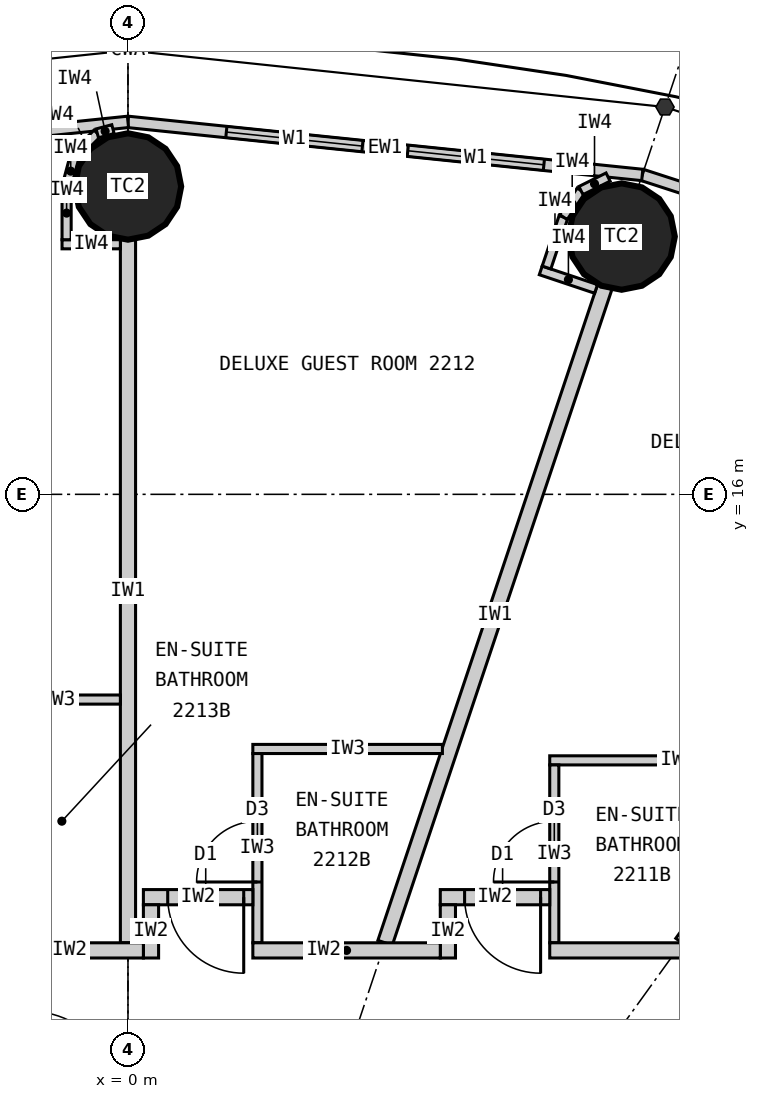
"""IFC4 building model, lengths in metres.
Left out: names, types, materials, properties, quantities, classifications, styles, units other than length and angle.
Written with IfcOpenShell. Run it as: python <this file> out.ifc"""

import sys

from ifc_helpers import new_model, si_unit, direction, frame, frame_2d, origin, origin_2d, place, context, subcontext, project, spatial, rectangle, circle, extrude, element, fill, save


model = new_model("IFC4")
c1 = context("Model", 3, precision=1e-05, world=origin(), true_north=direction((0.0, 1.0)))
c2 = subcontext(c1, "Body", "Model", "MODEL_VIEW")
j1 = project(units=[si_unit("LENGTHUNIT", "METRE"), si_unit("PLANEANGLEUNIT", "RADIAN")], contexts=[c1])
p1 = place(None, origin())
s1 = spatial("IfcSite", under=j1, at=p1, CompositionType="ELEMENT")
p2 = place(p1, origin())
s2 = spatial("IfcBuilding", under=s1, at=p2, CompositionType="ELEMENT")
p3 = place(p2, frame((0.0, 0.0, 87.0)))
s3 = spatial("IfcBuildingStorey", under=s2, at=p3, CompositionType="ELEMENT", Elevation=87.0)
for number, where, z_axis, x_axis in (
    (1, (6.495, 19.391, 0.0), (0.0, 0.0, 1.0), (1.0, 0.0, 0.0)),
    (2, (0.0, 20.05, 0.0), (0.0, 0.0, 1.0), (1.0, 0.0, 0.0)),
):
    element("IfcColumn", number, at=place(p3, frame(where, z_axis=z_axis, x_axis=x_axis)), inside=s3, PredefinedType="COLUMN", context=c2, shape_type="SweptSolid", body=[
        extrude(circle(Radius=0.7, at=origin_2d()), origin(), (0.0, 0.0, 1.0), 3.3),
    ])
p4 = place(p3, frame((13.096, 18.147, 0.0), z_axis=(0.0, 0.0, 1.0), x_axis=(-0.951137534625, 0.308767534285, 0.0)))
e3 = element("IfcWall", 3, at=p4, inside=s3, PredefinedType="ELEMENTEDWALL", context=c2, shape_type="SweptSolid", body=[
    extrude(rectangle(XDim=6.655, YDim=0.15, at=frame_2d((3.328, 0.0))), origin(), (0.0, 0.0, 1.0), 3.12),
])
p5 = place(p4, frame((1.228, 0.0, 0.9)))
e4 = element("IfcOpeningElement", 4, at=p5, cuts=e3, PredefinedType="OPENING", context=c2, shape_type="SweptSolid", body=[
    extrude(rectangle(XDim=1.8, YDim=1.9, at=frame_2d((0.9, 0.95))), frame((0.0, 0.085, 0.0), z_axis=(0.0, -1.0, 0.0), x_axis=(1.0, 0.0, 0.0)), (0.0, 0.0, 1.0), 0.17),
])
p6 = place(p4, frame((3.628, 0.0, 0.9)))
e5 = element("IfcOpeningElement", 5, at=p6, cuts=e3, PredefinedType="OPENING", context=c2, shape_type="SweptSolid", body=[
    extrude(rectangle(XDim=1.8, YDim=1.9, at=frame_2d((0.9, 0.95))), frame((0.0, 0.085, 0.0), z_axis=(0.0, -1.0, 0.0), x_axis=(1.0, 0.0, 0.0)), (0.0, 0.0, 1.0), 0.17),
])
p7 = place(p3, frame((6.766, 20.202, 0.0), z_axis=(0.0, 0.0, 1.0), x_axis=(-0.994721394369, 0.102612609291, 0.0)))
e6 = element("IfcWall", 6, at=p7, inside=s3, PredefinedType="ELEMENTEDWALL", context=c2, shape_type="SweptSolid", body=[
    extrude(rectangle(XDim=6.802, YDim=0.15, at=frame_2d((3.401, 0.0))), origin(), (0.0, 0.0, 1.0), 3.12),
])
p8 = place(p7, frame((1.301, 0.0, 0.9)))
e7 = element("IfcOpeningElement", 7, at=p8, cuts=e6, PredefinedType="OPENING", context=c2, shape_type="SweptSolid", body=[
    extrude(rectangle(XDim=1.8, YDim=1.9, at=frame_2d((0.9, 0.95))), frame((0.0, 0.085, 0.0), z_axis=(0.0, -1.0, 0.0), x_axis=(1.0, 0.0, 0.0)), (0.0, 0.0, 1.0), 0.17),
])
p9 = place(p7, frame((3.701, 0.0, 0.9)))
e8 = element("IfcOpeningElement", 8, at=p9, cuts=e6, PredefinedType="OPENING", context=c2, shape_type="SweptSolid", body=[
    extrude(rectangle(XDim=1.8, YDim=1.9, at=frame_2d((0.9, 0.95))), frame((0.0, 0.085, 0.0), z_axis=(0.0, -1.0, 0.0), x_axis=(1.0, 0.0, 0.0)), (0.0, 0.0, 1.0), 0.17),
])
p10 = place(p3, frame((0.0, 20.9, 0.0), z_axis=(0.0, 0.0, 1.0), x_axis=(-0.994721394369, -0.102612609291, 0.0)))
e9 = element("IfcWall", 9, at=p10, inside=s3, PredefinedType="ELEMENTEDWALL", context=c2, shape_type="SweptSolid", body=[
    extrude(rectangle(XDim=6.802, YDim=0.15, at=frame_2d((3.401, 0.0))), origin(), (0.0, 0.0, 1.0), 3.12),
])
p11 = place(p10, frame((1.301, 0.0, 0.9)))
e10 = element("IfcOpeningElement", 10, at=p11, cuts=e9, PredefinedType="OPENING", context=c2, shape_type="SweptSolid", body=[
    extrude(rectangle(XDim=1.8, YDim=1.9, at=frame_2d((0.9, 0.95))), frame((0.0, 0.085, 0.0), z_axis=(0.0, -1.0, 0.0), x_axis=(1.0, 0.0, 0.0)), (0.0, 0.0, 1.0), 0.17),
])
p12 = place(p10, frame((3.701, 0.0, 0.9)))
e11 = element("IfcOpeningElement", 11, at=p12, cuts=e9, PredefinedType="OPENING", context=c2, shape_type="SweptSolid", body=[
    extrude(rectangle(XDim=1.8, YDim=1.9, at=frame_2d((0.9, 0.95))), frame((0.0, 0.085, 0.0), z_axis=(0.0, -1.0, 0.0), x_axis=(1.0, 0.0, 0.0)), (0.0, 0.0, 1.0), 0.17),
])
p13 = place(p3, frame((7.289, 10.1, 0.0), z_axis=(0.0, 0.0, 1.0), x_axis=(0.585198353053, 0.810890182197, 0.0)))
e12 = element("IfcWall", 12, at=p13, inside=s3, PredefinedType="PARTITIONING", context=c2, shape_type="SweptSolid", body=[
    extrude(rectangle(XDim=8.36, YDim=0.2, at=frame_2d((4.18, 0.0))), origin(), (0.0, 0.0, 1.0), 2.27),
])
p14 = place(p3, frame((3.383, 10.1, 0.0), z_axis=(0.0, 0.0, 1.0), x_axis=(0.31759592231, 0.948226149256, 0.0)))
e13 = element("IfcWall", 13, at=p14, inside=s3, PredefinedType="PARTITIONING", context=c2, shape_type="SweptSolid", body=[
    extrude(rectangle(XDim=9.098, YDim=0.2, at=frame_2d((4.549, 0.0))), origin(), (0.0, 0.0, 1.0), 2.27),
])
p15 = place(p3, frame((0.0, 10.1, 0.0), z_axis=(0.0, 0.0, 1.0), x_axis=(0.0, 1.0, 0.0)))
e14 = element("IfcWall", 14, at=p15, inside=s3, PredefinedType="PARTITIONING", context=c2, shape_type="SweptSolid", body=[
    extrude(rectangle(XDim=9.25, YDim=0.2, at=frame_2d((4.625, 0.0))), origin(), (0.0, 0.0, 1.0), 2.27),
])
p16 = place(p3, frame((8.921, 12.5, 0.0), z_axis=(0.0, 0.0, 1.0), x_axis=(-1.0, 0.0, 0.0)))
e15 = element("IfcWall", 15, at=p16, inside=s3, PredefinedType="PARTITIONING", context=c2, shape_type="SweptSolid", body=[
    extrude(rectangle(XDim=3.372, YDim=0.12, at=frame_2d((1.686, 0.0))), origin(), (0.0, 0.0, 1.0), 3.12),
])
p17 = place(p3, frame((5.609, 10.1, 0.0), z_axis=(0.0, 0.0, 1.0), x_axis=(0.0, 1.0, 0.0)))
e16 = element("IfcWall", 16, at=p17, inside=s3, PredefinedType="PARTITIONING", context=c2, shape_type="SweptSolid", body=[
    extrude(rectangle(XDim=2.34, YDim=0.12, at=frame_2d((1.17, 0.0))), origin(), (0.0, 0.0, 1.0), 3.12),
])
p18 = place(p17, frame((0.8, 0.0, 0.0)))
e17 = element("IfcOpeningElement", 17, at=p18, cuts=e16, PredefinedType="OPENING", context=c2, shape_type="SweptSolid", body=[
    extrude(rectangle(XDim=0.8, YDim=2.1, at=frame_2d((0.4, 1.05))), frame((0.0, 0.07, 0.0), z_axis=(0.0, -1.0, 0.0), x_axis=(1.0, 0.0, 0.0)), (0.0, 0.0, 1.0), 0.14),
])
p19 = place(p3, frame((4.137, 12.65, 0.0), z_axis=(0.0, 0.0, 1.0), x_axis=(-1.0, 0.0, 0.0)))
e18 = element("IfcWall", 18, at=p19, inside=s3, PredefinedType="PARTITIONING", context=c2, shape_type="SweptSolid", body=[
    extrude(rectangle(XDim=2.494, YDim=0.12, at=frame_2d((1.247, 0.0))), origin(), (0.0, 0.0, 1.0), 3.12),
])
p20 = place(p3, frame((1.703, 10.1, 0.0), z_axis=(0.0, 0.0, 1.0), x_axis=(0.0, 1.0, 0.0)))
e19 = element("IfcWall", 19, at=p20, inside=s3, PredefinedType="PARTITIONING", context=c2, shape_type="SweptSolid", body=[
    extrude(rectangle(XDim=2.49, YDim=0.12, at=frame_2d((1.245, 0.0))), origin(), (0.0, 0.0, 1.0), 3.12),
])
p21 = place(p20, frame((0.8, 0.0, 0.0)))
e20 = element("IfcOpeningElement", 20, at=p21, cuts=e19, PredefinedType="OPENING", context=c2, shape_type="SweptSolid", body=[
    extrude(rectangle(XDim=0.8, YDim=2.1, at=frame_2d((0.4, 1.05))), frame((0.0, 0.07, 0.0), z_axis=(0.0, -1.0, 0.0), x_axis=(1.0, 0.0, 0.0)), (0.0, 0.0, 1.0), 0.14),
])
p22 = place(p3, frame((-0.1, 13.3, 0.0), z_axis=(0.0, 0.0, 1.0), x_axis=(-1.0, 0.0, 0.0)))
e21 = element("IfcWall", 21, at=p22, inside=s3, PredefinedType="PARTITIONING", context=c2, shape_type="SweptSolid", body=[
    extrude(rectangle(XDim=1.64, YDim=0.12, at=frame_2d((0.82, 0.0))), origin(), (0.0, 0.0, 1.0), 3.12),
])
p23 = place(p3, frame((4.109, 10.7, 0.0), z_axis=(0.0, 0.0, 1.0), x_axis=(1.0, 0.0, 0.0)))
e22 = element("IfcWall", 22, at=p23, inside=s3, PredefinedType="PARTITIONING", context=c2, shape_type="SweptSolid", body=[
    extrude(rectangle(XDim=1.44, YDim=0.2, at=frame_2d((0.72, 0.0))), origin(), (0.0, 0.0, 1.0), 3.12),
])
p24 = place(p23, frame((0.32, 0.0, 0.0)))
e23 = element("IfcOpeningElement", 23, at=p24, cuts=e22, PredefinedType="OPENING", context=c2, shape_type="SweptSolid", body=[
    extrude(rectangle(XDim=1.0, YDim=2.2, at=frame_2d((0.5, 1.1))), frame((0.0, 0.11, 0.0), z_axis=(0.0, -1.0, 0.0), x_axis=(1.0, 0.0, 0.0)), (0.0, 0.0, 1.0), 0.22),
])
p25 = place(p3, frame((4.209, 9.9, 0.0), z_axis=(0.0, 0.0, 1.0), x_axis=(0.0, 1.0, 0.0)))
e24 = element("IfcWall", 24, at=p25, inside=s3, PredefinedType="PARTITIONING", context=c2, shape_type="SweptSolid", body=[
    extrude(rectangle(XDim=0.7, YDim=0.2, at=frame_2d((0.35, 0.0))), origin(), (0.0, 0.0, 1.0), 3.12),
])
p26 = place(p3, frame((0.203, 10.7, 0.0), z_axis=(0.0, 0.0, 1.0), x_axis=(1.0, 0.0, 0.0)))
e25 = element("IfcWall", 25, at=p26, inside=s3, PredefinedType="PARTITIONING", context=c2, shape_type="SweptSolid", body=[
    extrude(rectangle(XDim=1.44, YDim=0.2, at=frame_2d((0.72, 0.0))), origin(), (0.0, 0.0, 1.0), 3.12),
])
p27 = place(p26, frame((0.32, 0.0, 0.0)))
e26 = element("IfcOpeningElement", 26, at=p27, cuts=e25, PredefinedType="OPENING", context=c2, shape_type="SweptSolid", body=[
    extrude(rectangle(XDim=1.0, YDim=2.2, at=frame_2d((0.5, 1.1))), frame((0.0, 0.11, 0.0), z_axis=(0.0, -1.0, 0.0), x_axis=(1.0, 0.0, 0.0)), (0.0, 0.0, 1.0), 0.22),
])
p28 = place(p3, frame((0.303, 9.9, 0.0), z_axis=(0.0, 0.0, 1.0), x_axis=(0.0, 1.0, 0.0)))
e27 = element("IfcWall", 27, at=p28, inside=s3, PredefinedType="PARTITIONING", context=c2, shape_type="SweptSolid", body=[
    extrude(rectangle(XDim=0.7, YDim=0.2, at=frame_2d((0.35, 0.0))), origin(), (0.0, 0.0, 1.0), 3.12),
])
p29 = place(p3, frame((-1.74, 10.0, 0.0), z_axis=(0.0, 0.0, 1.0), x_axis=(1.0, 0.0, 0.0)))
e28 = element("IfcWall", 28, at=p29, inside=s3, PredefinedType="PARTITIONING", context=c2, shape_type="SweptSolid", body=[
    extrude(rectangle(XDim=1.943, YDim=0.2, at=frame_2d((0.971, 0.0))), origin(), (0.0, 0.0, 1.0), 3.12),
])
p30 = place(p3, frame((1.643, 10.0, 0.0), z_axis=(0.0, 0.0, 1.0), x_axis=(1.0, 0.0, 0.0)))
e29 = element("IfcWall", 29, at=p30, inside=s3, PredefinedType="PARTITIONING", context=c2, shape_type="SweptSolid", body=[
    extrude(rectangle(XDim=2.466, YDim=0.2, at=frame_2d((1.233, 0.0))), origin(), (0.0, 0.0, 1.0), 3.12),
])
p31 = place(p3, frame((5.549, 10.0, 0.0), z_axis=(0.0, 0.0, 1.0), x_axis=(1.0, 0.0, 0.0)))
e30 = element("IfcWall", 30, at=p31, inside=s3, PredefinedType="PARTITIONING", context=c2, shape_type="SweptSolid", body=[
    extrude(rectangle(XDim=3.896, YDim=0.2, at=frame_2d((1.948, 0.0))), origin(), (0.0, 0.0, 1.0), 3.12),
])
p32 = place(p3, frame((6.159, 18.702, 0.0), z_axis=(0.0, 0.0, 1.0), x_axis=(-0.948173154049, 0.31775410295, 0.0)))
e31 = element("IfcWall", 31, at=p32, inside=s3, PredefinedType="PARTITIONING", context=c2, shape_type="SweptSolid", body=[
    extrude(rectangle(XDim=0.768, YDim=0.12, at=frame_2d((0.384, 0.0))), origin(), (0.0, 0.0, 1.0), 3.12),
])
p33 = place(p3, frame((5.507, 18.984, 0.0), z_axis=(0.0, 0.0, 1.0), x_axis=(0.317692050622, 0.948193946918, 0.0)))
e32 = element("IfcWall", 32, at=p33, inside=s3, PredefinedType="PARTITIONING", context=c2, shape_type="SweptSolid", body=[
    extrude(rectangle(XDim=0.7, YDim=0.12, at=frame_2d((0.35, 0.0))), origin(), (0.0, 0.0, 1.0), 3.12),
])
p34 = place(p3, frame((5.729, 19.648, 0.0), z_axis=(0.0, 0.0, 1.0), x_axis=(0.552135764955, 0.833754218615, 0.0)))
e33 = element("IfcWall", 33, at=p34, inside=s3, PredefinedType="PARTITIONING", context=c2, shape_type="SweptSolid", body=[
    extrude(rectangle(XDim=0.418, YDim=0.12, at=frame_2d((0.209, 0.0))), origin(), (0.0, 0.0, 1.0), 3.12),
])
p35 = place(p3, frame((5.96, 19.996, 0.0), z_axis=(0.0, 0.0, 1.0), x_axis=(0.895160725913, 0.445743507842, 0.0)))
e34 = element("IfcWall", 34, at=p35, inside=s3, PredefinedType="PARTITIONING", context=c2, shape_type="SweptSolid", body=[
    extrude(rectangle(XDim=0.399, YDim=0.12, at=frame_2d((0.199, 0.0))), origin(), (0.0, 0.0, 1.0), 3.12),
])
p36 = place(p3, frame((-0.1, 19.29, 0.0), z_axis=(0.0, 0.0, 1.0), x_axis=(-1.0, 0.0, 0.0)))
e35 = element("IfcWall", 35, at=p36, inside=s3, PredefinedType="PARTITIONING", context=c2, shape_type="SweptSolid", body=[
    extrude(rectangle(XDim=0.767, YDim=0.12, at=frame_2d((0.384, 0.0))), origin(), (0.0, 0.0, 1.0), 3.12),
])
p37 = place(p3, frame((-0.808, 19.35, 0.0), z_axis=(0.0, 0.0, 1.0), x_axis=(0.0, 1.0, 0.0)))
e36 = element("IfcWall", 36, at=p37, inside=s3, PredefinedType="PARTITIONING", context=c2, shape_type="SweptSolid", body=[
    extrude(rectangle(XDim=0.7, YDim=0.12, at=frame_2d((0.35, 0.0))), origin(), (0.0, 0.0, 1.0), 3.12),
])
p38 = place(p3, frame((-0.808, 20.05, 0.0), z_axis=(0.0, 0.0, 1.0), x_axis=(0.2592614205, 0.965807183573, 0.0)))
e37 = element("IfcWall", 37, at=p38, inside=s3, PredefinedType="PARTITIONING", context=c2, shape_type="SweptSolid", body=[
    extrude(rectangle(XDim=0.418, YDim=0.12, at=frame_2d((0.209, 0.0))), origin(), (0.0, 0.0, 1.0), 3.12),
])
p39 = place(p3, frame((-0.699, 20.454, 0.0), z_axis=(0.0, 0.0, 1.0), x_axis=(0.707106781187, 0.707106781187, 0.0)))
e38 = element("IfcWall", 38, at=p39, inside=s3, PredefinedType="PARTITIONING", context=c2, shape_type="SweptSolid", body=[
    extrude(rectangle(XDim=0.418, YDim=0.12, at=frame_2d((0.209, 0.0))), origin(), (0.0, 0.0, 1.0), 3.12),
])
p40 = place(p3, frame((-0.404, 20.749, 0.0), z_axis=(0.0, 0.0, 1.0), x_axis=(0.965759066438, 0.25944060128, 0.0)))
e39 = element("IfcWall", 39, at=p40, inside=s3, PredefinedType="PARTITIONING", context=c2, shape_type="SweptSolid", body=[
    extrude(rectangle(XDim=0.214, YDim=0.12, at=frame_2d((0.107, 0.0))), origin(), (0.0, 0.0, 1.0), 3.12),
])
p41 = place(p8, origin())
e40 = element("IfcWindow", 40, at=p41, inside=s3, PartitioningType="SINGLE_PANEL", PredefinedType="WINDOW", context=c2, shape_type="SweptSolid", body=[
    extrude(rectangle(XDim=1.8, YDim=1.9, at=frame_2d((0.9, 0.95))), frame((0.0, 0.03, 0.0), z_axis=(0.0, -1.0, 0.0), x_axis=(1.0, 0.0, 0.0)), (0.0, 0.0, 1.0), 0.06),
])
fill(e7, e40)
p42 = place(p9, origin())
e41 = element("IfcWindow", 41, at=p42, inside=s3, PartitioningType="SINGLE_PANEL", PredefinedType="WINDOW", context=c2, shape_type="SweptSolid", body=[
    extrude(rectangle(XDim=1.8, YDim=1.9, at=frame_2d((0.9, 0.95))), frame((0.0, 0.03, 0.0), z_axis=(0.0, -1.0, 0.0), x_axis=(1.0, 0.0, 0.0)), (0.0, 0.0, 1.0), 0.06),
])
fill(e8, e41)
p43 = place(p18, origin())
e42 = element("IfcDoor", 42, at=p43, inside=s3, OperationType="SINGLE_SWING_LEFT", PredefinedType="DOOR", context=c2, shape_type="SweptSolid", body=[
    extrude(rectangle(XDim=0.8, YDim=2.1, at=frame_2d((0.4, 1.05))), frame((0.0, 0.025, 0.0), z_axis=(0.0, -1.0, 0.0), x_axis=(1.0, 0.0, 0.0)), (0.0, 0.0, 1.0), 0.05),
])
fill(e17, e42)
p44 = place(p24, origin())
e43 = element("IfcDoor", 43, at=p44, inside=s3, OperationType="SINGLE_SWING_RIGHT", PredefinedType="DOOR", context=c2, shape_type="SweptSolid", body=[
    extrude(rectangle(XDim=1.0, YDim=2.2, at=frame_2d((0.5, 1.1))), frame((0.0, 0.025, 0.0), z_axis=(0.0, -1.0, 0.0), x_axis=(1.0, 0.0, 0.0)), (0.0, 0.0, 1.0), 0.05),
])
fill(e23, e43)
p45 = place(p21, origin())
e44 = element("IfcDoor", 44, at=p45, inside=s3, OperationType="SINGLE_SWING_LEFT", PredefinedType="DOOR", context=c2, shape_type="SweptSolid", body=[
    extrude(rectangle(XDim=0.8, YDim=2.1, at=frame_2d((0.4, 1.05))), frame((0.0, 0.025, 0.0), z_axis=(0.0, -1.0, 0.0), x_axis=(1.0, 0.0, 0.0)), (0.0, 0.0, 1.0), 0.05),
])
fill(e20, e44)
p46 = place(p27, origin())
e45 = element("IfcDoor", 45, at=p46, inside=s3, OperationType="SINGLE_SWING_RIGHT", PredefinedType="DOOR", context=c2, shape_type="SweptSolid", body=[
    extrude(rectangle(XDim=1.0, YDim=2.2, at=frame_2d((0.5, 1.1))), frame((0.0, 0.025, 0.0), z_axis=(0.0, -1.0, 0.0), x_axis=(1.0, 0.0, 0.0)), (0.0, 0.0, 1.0), 0.05),
])
fill(e26, e45)
save(model, sys.argv[1])
